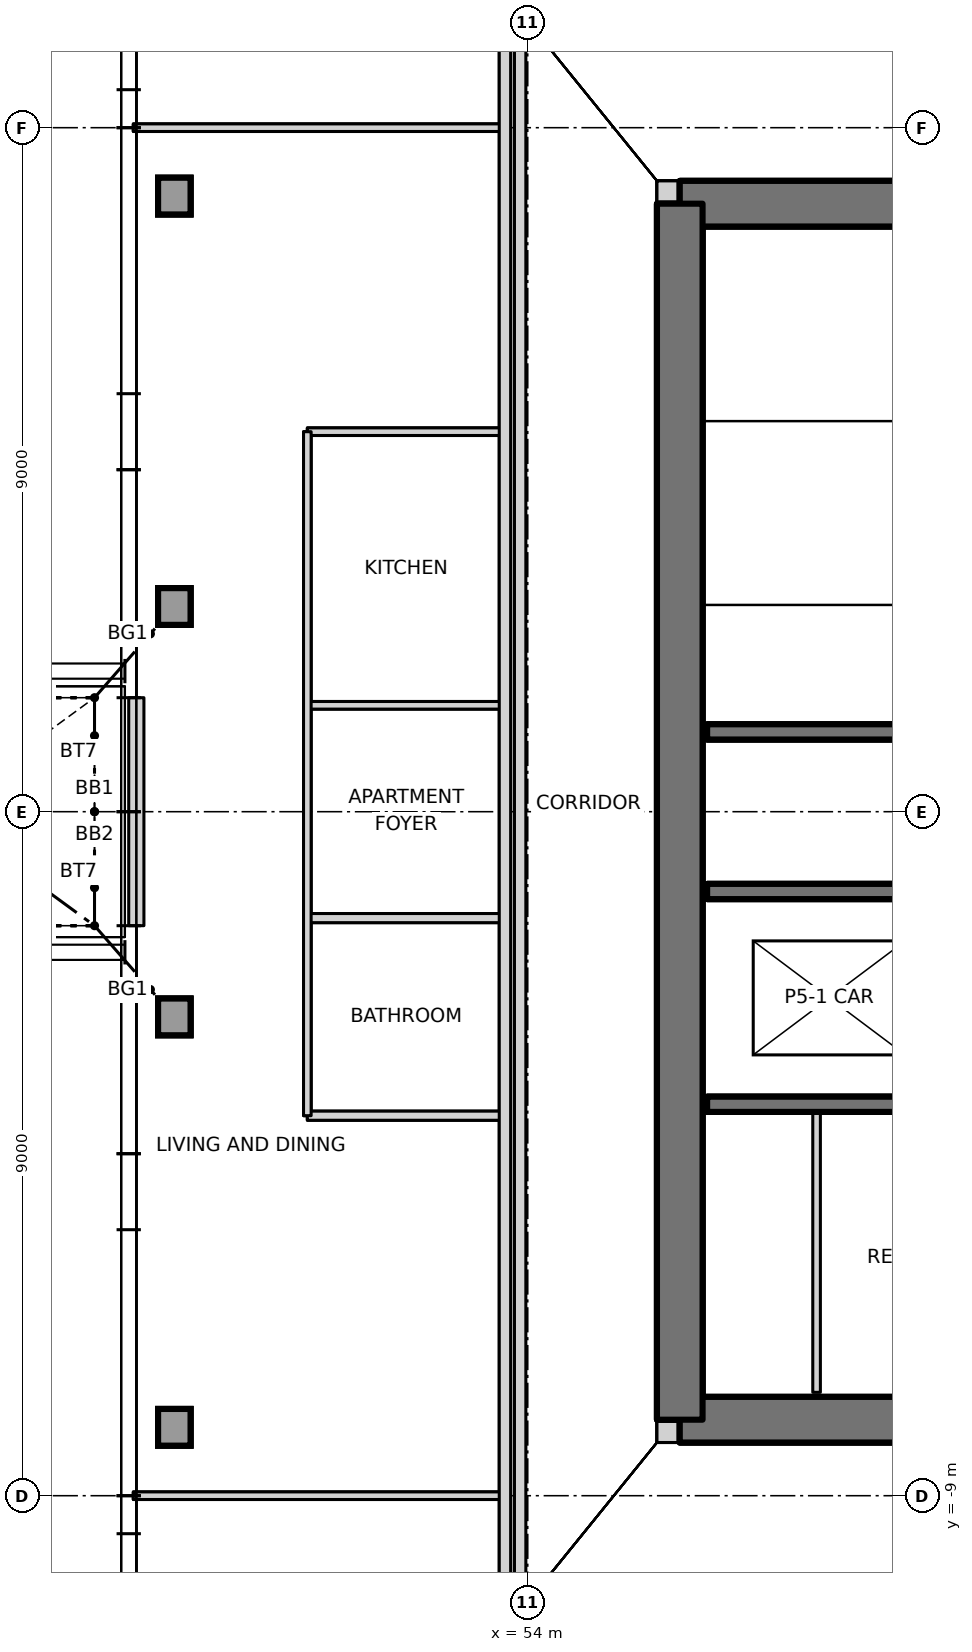
"""IFC4 building model, lengths in metres.
Left out: names, types, materials, properties, quantities, classifications, styles, units other than length and angle.
Written with IfcOpenShell. Run it as: python <this file> out.ifc"""

import sys

from ifc_helpers import new_model, si_unit, direction, frame, frame_2d, origin, origin_2d, place, context, subcontext, project, spatial, rectangle, i_section, extrude, element, fill, save


model = new_model("IFC4")
c1 = context("Model", 3, precision=1e-05, world=origin(), true_north=direction((0.0, 1.0)))
c2 = subcontext(c1, "Body", "Model", "MODEL_VIEW")
j1 = project(units=[si_unit("LENGTHUNIT", "METRE"), si_unit("PLANEANGLEUNIT", "RADIAN")], contexts=[c1])
p1 = place(None, origin())
s1 = spatial("IfcSite", under=j1, at=p1, CompositionType="ELEMENT")
p2 = place(p1, origin())
s2 = spatial("IfcBuilding", under=s1, at=p2, CompositionType="ELEMENT")
p3 = place(p2, frame((0.0, 0.0, 94.5)))
s3 = spatial("IfcBuildingStorey", under=s2, at=p3, CompositionType="ELEMENT", Elevation=94.5)
for number, where, z_axis, x_axis in (
    (1, (49.35, 8.1, 0.0), (0.0, 0.0, 1.0), (1.0, 0.0, 0.0)),
    (2, (49.35, 2.7, 0.0), (0.0, 0.0, 1.0), (1.0, 0.0, 0.0)),
    (3, (49.35, -2.7, 0.0), (0.0, 0.0, 1.0), (1.0, 0.0, 0.0)),
    (4, (49.35, -8.1, 0.0), (0.0, 0.0, 1.0), (1.0, 0.0, 0.0)),
):
    element("IfcColumn", number, at=place(p3, frame(where, z_axis=z_axis, x_axis=x_axis)), inside=s3, PredefinedType="COLUMN", context=c2, shape_type="SweptSolid", body=[
        extrude(i_section(OverallWidth=0.427, OverallDepth=0.483, WebThickness=0.051, FlangeThickness=0.082, at=origin_2d()), origin(), (0.0, 0.0, 1.0), 3.5),
    ])
for number, where, z_axis, x_axis in (
    (5, (55.7, -8.15, 0.0), (0.0, 0.0, 1.0), (1.0, 0.0, 0.0)),
    (6, (55.7, 8.15, 0.0), (0.0, 0.0, 1.0), (1.0, 0.0, 0.0)),
):
    element("IfcWall", number, at=place(p3, frame(where, z_axis=z_axis, x_axis=x_axis)), inside=s3, PredefinedType="SOLIDWALL", context=c2, shape_type="SweptSolid", body=[
        extrude(rectangle(XDim=0.3, YDim=0.3, at=frame_2d((0.15, 0.0))), origin(), (0.0, 0.0, 1.0), 3.5),
    ])
p4 = place(p3, frame((56.0, -8.0, 0.0), z_axis=(0.0, 0.0, 1.0), x_axis=(1.0, 0.0, 0.0)))
e7 = element("IfcWall", 7, at=p4, inside=s3, PredefinedType="SHEAR", context=c2, shape_type="SweptSolid", body=[
    extrude(rectangle(XDim=14.0, YDim=0.6, at=frame_2d((7.0, 0.0))), origin(), (0.0, 0.0, 1.0), 3.5),
])
p5 = place(p4, frame((2.7, 0.0, 0.0)))
e8 = element("IfcOpeningElement", 8, at=p5, cuts=e7, PredefinedType="OPENING", context=c2, shape_type="SweptSolid", body=[
    extrude(rectangle(XDim=0.9, YDim=2.1, at=frame_2d((0.45, 1.05))), frame((0.0, 0.31, 0.0), z_axis=(0.0, -1.0, 0.0), x_axis=(1.0, 0.0, 0.0)), (0.0, 0.0, 1.0), 0.62),
])
p6 = place(p4, frame((7.7, 0.0, 0.0)))
e9 = element("IfcOpeningElement", 9, at=p6, cuts=e7, PredefinedType="OPENING", context=c2, shape_type="SweptSolid", body=[
    extrude(rectangle(XDim=0.9, YDim=2.1, at=frame_2d((0.45, 1.05))), frame((0.0, 0.31, 0.0), z_axis=(0.0, -1.0, 0.0), x_axis=(1.0, 0.0, 0.0)), (0.0, 0.0, 1.0), 0.62),
])
p7 = place(p3, frame((70.0, 8.0, 0.0), z_axis=(0.0, 0.0, 1.0), x_axis=(-1.0, 0.0, 0.0)))
e10 = element("IfcWall", 10, at=p7, inside=s3, PredefinedType="SHEAR", context=c2, shape_type="SweptSolid", body=[
    extrude(rectangle(XDim=14.0, YDim=0.6, at=frame_2d((7.0, 0.0))), origin(), (0.0, 0.0, 1.0), 3.5),
])
p8 = place(p7, frame((8.2, 0.0, 0.0)))
e11 = element("IfcOpeningElement", 11, at=p8, cuts=e10, PredefinedType="OPENING", context=c2, shape_type="SweptSolid", body=[
    extrude(rectangle(XDim=0.9, YDim=2.1, at=frame_2d((0.45, 1.05))), frame((0.0, 0.31, 0.0), z_axis=(0.0, -1.0, 0.0), x_axis=(1.0, 0.0, 0.0)), (0.0, 0.0, 1.0), 0.62),
])
p9 = place(p7, frame((3.2, 0.0, 0.0)))
e12 = element("IfcOpeningElement", 12, at=p9, cuts=e10, PredefinedType="OPENING", context=c2, shape_type="SweptSolid", body=[
    extrude(rectangle(XDim=0.9, YDim=2.1, at=frame_2d((0.45, 1.05))), frame((0.0, 0.31, 0.0), z_axis=(0.0, -1.0, 0.0), x_axis=(1.0, 0.0, 0.0)), (0.0, 0.0, 1.0), 0.62),
])
p10 = place(p3, frame((56.0, 8.0, 0.0), z_axis=(0.0, 0.0, 1.0), x_axis=(0.0, -1.0, 0.0)))
e13 = element("IfcWall", 13, at=p10, inside=s3, PredefinedType="SHEAR", context=c2, shape_type="SweptSolid", body=[
    extrude(rectangle(XDim=16.0, YDim=0.6, at=frame_2d((8.0, 0.0))), origin(), (0.0, 0.0, 1.0), 3.5),
])
p11 = place(p10, frame((7.5, 0.0, 0.0)))
e14 = element("IfcOpeningElement", 14, at=p11, cuts=e13, PredefinedType="OPENING", context=c2, shape_type="SweptSolid", body=[
    extrude(rectangle(XDim=1.0, YDim=2.1, at=frame_2d((0.5, 1.05))), frame((0.0, 0.31, 0.0), z_axis=(0.0, -1.0, 0.0), x_axis=(1.0, 0.0, 0.0)), (0.0, 0.0, 1.0), 0.62),
])
p12 = place(p3, frame((48.81, -9.0, 0.0), z_axis=(0.0, 0.0, 1.0), x_axis=(1.0, 0.0, 0.0)))
e15 = element("IfcWall", 15, at=p12, inside=s3, PredefinedType="PARTITIONING", context=c2, shape_type="SweptSolid", body=[
    extrude(rectangle(XDim=4.89, YDim=0.1, at=frame_2d((2.445, 0.0))), origin(), (0.0, 0.0, 1.0), 3.27),
])
p13 = place(p12, frame((2.02, 0.0, 0.0)))
e16 = element("IfcOpeningElement", 16, at=p13, cuts=e15, PredefinedType="OPENING", context=c2, shape_type="SweptSolid", body=[
    extrude(rectangle(XDim=0.85, YDim=2.1, at=frame_2d((0.425, 1.05))), frame((0.0, 0.06, 0.0), z_axis=(0.0, -1.0, 0.0), x_axis=(1.0, 0.0, 0.0)), (0.0, 0.0, 1.0), 0.12),
])
p14 = place(p3, frame((51.1, -4.0, 0.0), z_axis=(0.0, 0.0, 1.0), x_axis=(1.0, 0.0, 0.0)))
e17 = element("IfcWall", 17, at=p14, inside=s3, PredefinedType="PARTITIONING", context=c2, shape_type="SweptSolid", body=[
    extrude(rectangle(XDim=2.6, YDim=0.12, at=frame_2d((1.3, 0.0))), origin(), (0.0, 0.0, 1.0), 3.27),
])
p15 = place(p3, frame((56.36, -3.85, 0.0), z_axis=(0.0, 0.0, 1.0), x_axis=(1.0, 0.0, 0.0)))
e18 = element("IfcWall", 18, at=p15, inside=s3, PredefinedType="SOLIDWALL", context=c2, shape_type="SweptSolid", body=[
    extrude(rectangle(XDim=9.94, YDim=0.2, at=frame_2d((4.97, 0.0))), origin(), (0.0, 0.0, 1.0), 3.5),
])
p16 = place(p3, frame((51.1, -1.4, 0.0), z_axis=(0.0, 0.0, 1.0), x_axis=(1.0, 0.0, 0.0)))
e19 = element("IfcWall", 19, at=p16, inside=s3, PredefinedType="PARTITIONING", context=c2, shape_type="SweptSolid", body=[
    extrude(rectangle(XDim=2.6, YDim=0.12, at=frame_2d((1.3, 0.0))), origin(), (0.0, 0.0, 1.0), 3.27),
])
p17 = place(p16, frame((0.875, 0.0, 0.0)))
e20 = element("IfcOpeningElement", 20, at=p17, cuts=e19, PredefinedType="OPENING", context=c2, shape_type="SweptSolid", body=[
    extrude(rectangle(XDim=0.85, YDim=2.1, at=frame_2d((0.425, 1.05))), frame((0.0, 0.07, 0.0), z_axis=(0.0, -1.0, 0.0), x_axis=(1.0, 0.0, 0.0)), (0.0, 0.0, 1.0), 0.14),
])
p18 = place(p3, frame((56.36, -1.05, 0.0), z_axis=(0.0, 0.0, 1.0), x_axis=(1.0, 0.0, 0.0)))
e21 = element("IfcWall", 21, at=p18, inside=s3, PredefinedType="SOLIDWALL", context=c2, shape_type="SweptSolid", body=[
    extrude(rectangle(XDim=13.28, YDim=0.2, at=frame_2d((6.64, 0.0))), origin(), (0.0, 0.0, 1.0), 3.5),
])
p19 = place(p18, frame((11.11, 0.0, 0.0)))
e22 = element("IfcOpeningElement", 22, at=p19, cuts=e21, PredefinedType="OPENING", context=c2, shape_type="SweptSolid", body=[
    extrude(rectangle(XDim=1.0, YDim=2.1, at=frame_2d((0.5, 1.05))), frame((0.0, 0.11, 0.0), z_axis=(0.0, -1.0, 0.0), x_axis=(1.0, 0.0, 0.0)), (0.0, 0.0, 1.0), 0.22),
])
p20 = place(p18, frame((1.087, 0.0, 0.0)))
e23 = element("IfcOpeningElement", 23, at=p20, cuts=e21, PredefinedType="OPENING", context=c2, shape_type="SweptSolid", body=[
    extrude(rectangle(XDim=1.1, YDim=2.1, at=frame_2d((0.55, 1.05))), frame((0.0, 0.11, 0.0), z_axis=(0.0, -1.0, 0.0), x_axis=(1.0, 0.0, 0.0)), (0.0, 0.0, 1.0), 0.22),
])
p21 = place(p18, frame((4.39, 0.0, 0.0)))
e24 = element("IfcOpeningElement", 24, at=p21, cuts=e21, PredefinedType="OPENING", context=c2, shape_type="SweptSolid", body=[
    extrude(rectangle(XDim=1.1, YDim=2.1, at=frame_2d((0.55, 1.05))), frame((0.0, 0.11, 0.0), z_axis=(0.0, -1.0, 0.0), x_axis=(1.0, 0.0, 0.0)), (0.0, 0.0, 1.0), 0.22),
])
p22 = place(p18, frame((7.724, 0.0, 0.0)))
e25 = element("IfcOpeningElement", 25, at=p22, cuts=e21, PredefinedType="OPENING", context=c2, shape_type="SweptSolid", body=[
    extrude(rectangle(XDim=1.1, YDim=2.1, at=frame_2d((0.55, 1.05))), frame((0.0, 0.11, 0.0), z_axis=(0.0, -1.0, 0.0), x_axis=(1.0, 0.0, 0.0)), (0.0, 0.0, 1.0), 0.22),
])
p23 = place(p3, frame((56.36, 1.05, 0.0), z_axis=(0.0, 0.0, 1.0), x_axis=(1.0, 0.0, 0.0)))
e26 = element("IfcWall", 26, at=p23, inside=s3, PredefinedType="SOLIDWALL", context=c2, shape_type="SweptSolid", body=[
    extrude(rectangle(XDim=13.28, YDim=0.2, at=frame_2d((6.64, 0.0))), origin(), (0.0, 0.0, 1.0), 3.5),
])
p24 = place(p23, frame((1.17, 0.0, 0.0)))
e27 = element("IfcOpeningElement", 27, at=p24, cuts=e26, PredefinedType="OPENING", context=c2, shape_type="SweptSolid", body=[
    extrude(rectangle(XDim=1.0, YDim=2.1, at=frame_2d((0.5, 1.05))), frame((0.0, 0.11, 0.0), z_axis=(0.0, -1.0, 0.0), x_axis=(1.0, 0.0, 0.0)), (0.0, 0.0, 1.0), 0.22),
])
p25 = place(p23, frame((6.19, 0.0, 0.0)))
e28 = element("IfcOpeningElement", 28, at=p25, cuts=e26, PredefinedType="OPENING", context=c2, shape_type="SweptSolid", body=[
    extrude(rectangle(XDim=0.9, YDim=2.1, at=frame_2d((0.45, 1.05))), frame((0.0, 0.11, 0.0), z_axis=(0.0, -1.0, 0.0), x_axis=(1.0, 0.0, 0.0)), (0.0, 0.0, 1.0), 0.22),
])
p26 = place(p23, frame((10.96, 0.0, 0.0)))
e29 = element("IfcOpeningElement", 29, at=p26, cuts=e26, PredefinedType="OPENING", context=c2, shape_type="SweptSolid", body=[
    extrude(rectangle(XDim=1.3, YDim=2.1, at=frame_2d((0.65, 1.05))), frame((0.0, 0.11, 0.0), z_axis=(0.0, -1.0, 0.0), x_axis=(1.0, 0.0, 0.0)), (0.0, 0.0, 1.0), 0.22),
])
for number, where, z_axis, x_axis in (
    (30, (51.1, 1.4, 0.0), (0.0, 0.0, 1.0), (1.0, 0.0, 0.0)),
    (31, (51.1, 5.0, 0.0), (0.0, 0.0, 1.0), (1.0, 0.0, 0.0)),
):
    element("IfcWall", number, at=place(p3, frame(where, z_axis=z_axis, x_axis=x_axis)), inside=s3, PredefinedType="PARTITIONING", context=c2, shape_type="SweptSolid", body=[
        extrude(rectangle(XDim=2.6, YDim=0.1, at=frame_2d((1.3, 0.0))), origin(), (0.0, 0.0, 1.0), 3.27),
    ])
p27 = place(p3, frame((48.81, 9.0, 0.0), z_axis=(0.0, 0.0, 1.0), x_axis=(1.0, 0.0, 0.0)))
e32 = element("IfcWall", 32, at=p27, inside=s3, PredefinedType="PARTITIONING", context=c2, shape_type="SweptSolid", body=[
    extrude(rectangle(XDim=4.89, YDim=0.1, at=frame_2d((2.445, 0.0))), origin(), (0.0, 0.0, 1.0), 3.27),
])
p28 = place(p27, frame((2.02, 0.0, 0.0)))
e33 = element("IfcOpeningElement", 33, at=p28, cuts=e32, PredefinedType="OPENING", context=c2, shape_type="SweptSolid", body=[
    extrude(rectangle(XDim=0.85, YDim=2.1, at=frame_2d((0.425, 1.05))), frame((0.0, 0.06, 0.0), z_axis=(0.0, -1.0, 0.0), x_axis=(1.0, 0.0, 0.0)), (0.0, 0.0, 1.0), 0.12),
])
p29 = place(p3, frame((57.8, -7.64, 0.0), z_axis=(0.0, 0.0, 1.0), x_axis=(0.0, 1.0, 0.0)))
e34 = element("IfcWall", 34, at=p29, inside=s3, PredefinedType="PARTITIONING", context=c2, shape_type="SweptSolid", body=[
    extrude(rectangle(XDim=3.79, YDim=0.1, at=frame_2d((1.895, 0.0))), origin(), (0.0, 0.0, 1.0), 3.3),
])
p30 = place(p29, frame((1.445, 0.0, 0.0)))
e35 = element("IfcOpeningElement", 35, at=p30, cuts=e34, PredefinedType="OPENING", context=c2, shape_type="SweptSolid", body=[
    extrude(rectangle(XDim=0.9, YDim=2.1, at=frame_2d((0.45, 1.05))), frame((0.0, 0.06, 0.0), z_axis=(0.0, -1.0, 0.0), x_axis=(1.0, 0.0, 0.0)), (0.0, 0.0, 1.0), 0.12),
])
p31 = place(p3, frame((53.7, -10.768, 0.0), z_axis=(0.0, 0.0, 1.0), x_axis=(0.0, 1.0, 0.0)))
e36 = element("IfcWall", 36, at=p31, inside=s3, PredefinedType="PARTITIONING", context=c2, shape_type="SweptSolid", body=[
    extrude(rectangle(XDim=21.536, YDim=0.15, at=frame_2d((10.768, 0.0))), origin(), (0.0, 0.0, 1.0), 3.27),
])
p32 = place(p31, frame((10.268, 0.0, 0.0)))
e37 = element("IfcOpeningElement", 37, at=p32, cuts=e36, PredefinedType="OPENING", context=c2, shape_type="SweptSolid", body=[
    extrude(rectangle(XDim=1.0, YDim=2.1, at=frame_2d((0.5, 1.05))), frame((0.0, 0.085, 0.0), z_axis=(0.0, -1.0, 0.0), x_axis=(1.0, 0.0, 0.0)), (0.0, 0.0, 1.0), 0.17),
])
p33 = place(p3, frame((51.1, -4.0, 0.0), z_axis=(0.0, 0.0, 1.0), x_axis=(0.0, 1.0, 0.0)))
e38 = element("IfcWall", 38, at=p33, inside=s3, PredefinedType="PARTITIONING", context=c2, shape_type="SweptSolid", body=[
    extrude(rectangle(XDim=9.0, YDim=0.1, at=frame_2d((4.5, 0.0))), origin(), (0.0, 0.0, 1.0), 3.27),
])
p34 = place(p33, frame((6.775, 0.0, 0.0)))
e39 = element("IfcOpeningElement", 39, at=p34, cuts=e38, PredefinedType="OPENING", context=c2, shape_type="SweptSolid", body=[
    extrude(rectangle(XDim=0.85, YDim=2.1, at=frame_2d((0.425, 1.05))), frame((0.0, 0.06, 0.0), z_axis=(0.0, -1.0, 0.0), x_axis=(1.0, 0.0, 0.0)), (0.0, 0.0, 1.0), 0.12),
])
p35 = place(p33, frame((3.575, 0.0, 0.0)))
e40 = element("IfcOpeningElement", 40, at=p35, cuts=e38, PredefinedType="OPENING", context=c2, shape_type="SweptSolid", body=[
    extrude(rectangle(XDim=0.85, YDim=2.1, at=frame_2d((0.425, 1.05))), frame((0.0, 0.06, 0.0), z_axis=(0.0, -1.0, 0.0), x_axis=(1.0, 0.0, 0.0)), (0.0, 0.0, 1.0), 0.12),
])
p36 = place(p24, origin())
e41 = element("IfcDoor", 41, at=p36, inside=s3, OperationType="SINGLE_SWING_RIGHT", PredefinedType="DOOR", context=c2, shape_type="SweptSolid", body=[
    extrude(rectangle(XDim=1.0, YDim=2.1, at=frame_2d((0.5, 1.05))), frame((0.0, 0.025, 0.0), z_axis=(0.0, -1.0, 0.0), x_axis=(1.0, 0.0, 0.0)), (0.0, 0.0, 1.0), 0.05),
])
fill(e27, e41)
p37 = place(p30, origin())
e42 = element("IfcDoor", 42, at=p37, inside=s3, OperationType="SLIDING_TO_LEFT", PredefinedType="DOOR", context=c2, shape_type="SweptSolid", body=[
    extrude(rectangle(XDim=0.9, YDim=2.1, at=frame_2d((0.45, 1.05))), frame((0.0, 0.025, 0.0), z_axis=(0.0, -1.0, 0.0), x_axis=(1.0, 0.0, 0.0)), (0.0, 0.0, 1.0), 0.05),
])
fill(e35, e42)
p38 = place(p34, origin())
e43 = element("IfcDoor", 43, at=p38, inside=s3, OperationType="SINGLE_SWING_RIGHT", PredefinedType="DOOR", context=c2, shape_type="SweptSolid", body=[
    extrude(rectangle(XDim=0.85, YDim=2.1, at=frame_2d((0.425, 1.05))), frame((0.0, 0.025, 0.0), z_axis=(0.0, -1.0, 0.0), x_axis=(1.0, 0.0, 0.0)), (0.0, 0.0, 1.0), 0.05),
])
fill(e39, e43)
p39 = place(p32, origin())
e44 = element("IfcDoor", 44, at=p39, inside=s3, OperationType="SINGLE_SWING_LEFT", PredefinedType="DOOR", context=c2, shape_type="SweptSolid", body=[
    extrude(rectangle(XDim=1.0, YDim=2.1, at=frame_2d((0.5, 1.05))), frame((0.0, 0.025, 0.0), z_axis=(0.0, -1.0, 0.0), x_axis=(1.0, 0.0, 0.0)), (0.0, 0.0, 1.0), 0.05),
])
fill(e37, e44)
p40 = place(p35, origin())
e45 = element("IfcDoor", 45, at=p40, inside=s3, OperationType="SINGLE_SWING_LEFT", PredefinedType="DOOR", context=c2, shape_type="SweptSolid", body=[
    extrude(rectangle(XDim=0.85, YDim=2.1, at=frame_2d((0.425, 1.05))), frame((0.0, 0.025, 0.0), z_axis=(0.0, -1.0, 0.0), x_axis=(1.0, 0.0, 0.0)), (0.0, 0.0, 1.0), 0.05),
])
fill(e40, e45)
p41 = place(p17, frame((0.85, 0.0, 0.0), z_axis=(0.0, 0.0, 1.0), x_axis=(-1.0, 0.0, 0.0)))
e46 = element("IfcDoor", 46, at=p41, inside=s3, OperationType="SINGLE_SWING_RIGHT", PredefinedType="DOOR", context=c2, shape_type="SweptSolid", body=[
    extrude(rectangle(XDim=0.85, YDim=2.1, at=frame_2d((0.425, 1.05))), frame((0.0, 0.025, 0.0), z_axis=(0.0, -1.0, 0.0), x_axis=(1.0, 0.0, 0.0)), (0.0, 0.0, 1.0), 0.05),
])
fill(e20, e46)
p42 = place(p28, frame((0.85, 0.0, 0.0), z_axis=(0.0, 0.0, 1.0), x_axis=(-1.0, 0.0, 0.0)))
e47 = element("IfcDoor", 47, at=p42, inside=s3, OperationType="SINGLE_SWING_LEFT", PredefinedType="DOOR", context=c2, shape_type="SweptSolid", body=[
    extrude(rectangle(XDim=0.85, YDim=2.1, at=frame_2d((0.425, 1.05))), frame((0.0, 0.025, 0.0), z_axis=(0.0, -1.0, 0.0), x_axis=(1.0, 0.0, 0.0)), (0.0, 0.0, 1.0), 0.05),
])
fill(e33, e47)
p43 = place(p13, origin())
e48 = element("IfcDoor", 48, at=p43, inside=s3, OperationType="SINGLE_SWING_RIGHT", PredefinedType="DOOR", context=c2, shape_type="SweptSolid", body=[
    extrude(rectangle(XDim=0.85, YDim=2.1, at=frame_2d((0.425, 1.05))), frame((0.0, 0.025, 0.0), z_axis=(0.0, -1.0, 0.0), x_axis=(1.0, 0.0, 0.0)), (0.0, 0.0, 1.0), 0.05),
])
fill(e16, e48)
p44 = place(p11, origin())
e49 = element("IfcDoor", 49, at=p44, inside=s3, OperationType="SINGLE_SWING_RIGHT", PredefinedType="DOOR", context=c2, shape_type="SweptSolid", body=[
    extrude(rectangle(XDim=1.0, YDim=2.1, at=frame_2d((0.5, 1.05))), frame((0.0, 0.025, 0.0), z_axis=(0.0, -1.0, 0.0), x_axis=(1.0, 0.0, 0.0)), (0.0, 0.0, 1.0), 0.05),
])
fill(e14, e49)
p45 = place(p5, origin())
e50 = element("IfcDoor", 50, at=p45, inside=s3, OperationType="SINGLE_SWING_LEFT", PredefinedType="DOOR", context=c2, shape_type="SweptSolid", body=[
    extrude(rectangle(XDim=0.9, YDim=2.1, at=frame_2d((0.45, 1.05))), frame((0.0, 0.025, 0.0), z_axis=(0.0, -1.0, 0.0), x_axis=(1.0, 0.0, 0.0)), (0.0, 0.0, 1.0), 0.05),
])
fill(e8, e50)
p46 = place(p20, origin())
e51 = element("IfcDoor", 51, at=p46, inside=s3, OperationType="DOUBLE_DOOR_SLIDING", PredefinedType="DOOR", context=c2, shape_type="SweptSolid", body=[
    extrude(rectangle(XDim=1.1, YDim=2.1, at=frame_2d((0.55, 1.05))), frame((0.0, 0.025, 0.0), z_axis=(0.0, -1.0, 0.0), x_axis=(1.0, 0.0, 0.0)), (0.0, 0.0, 1.0), 0.05),
])
fill(e23, e51)
save(model, sys.argv[1])
